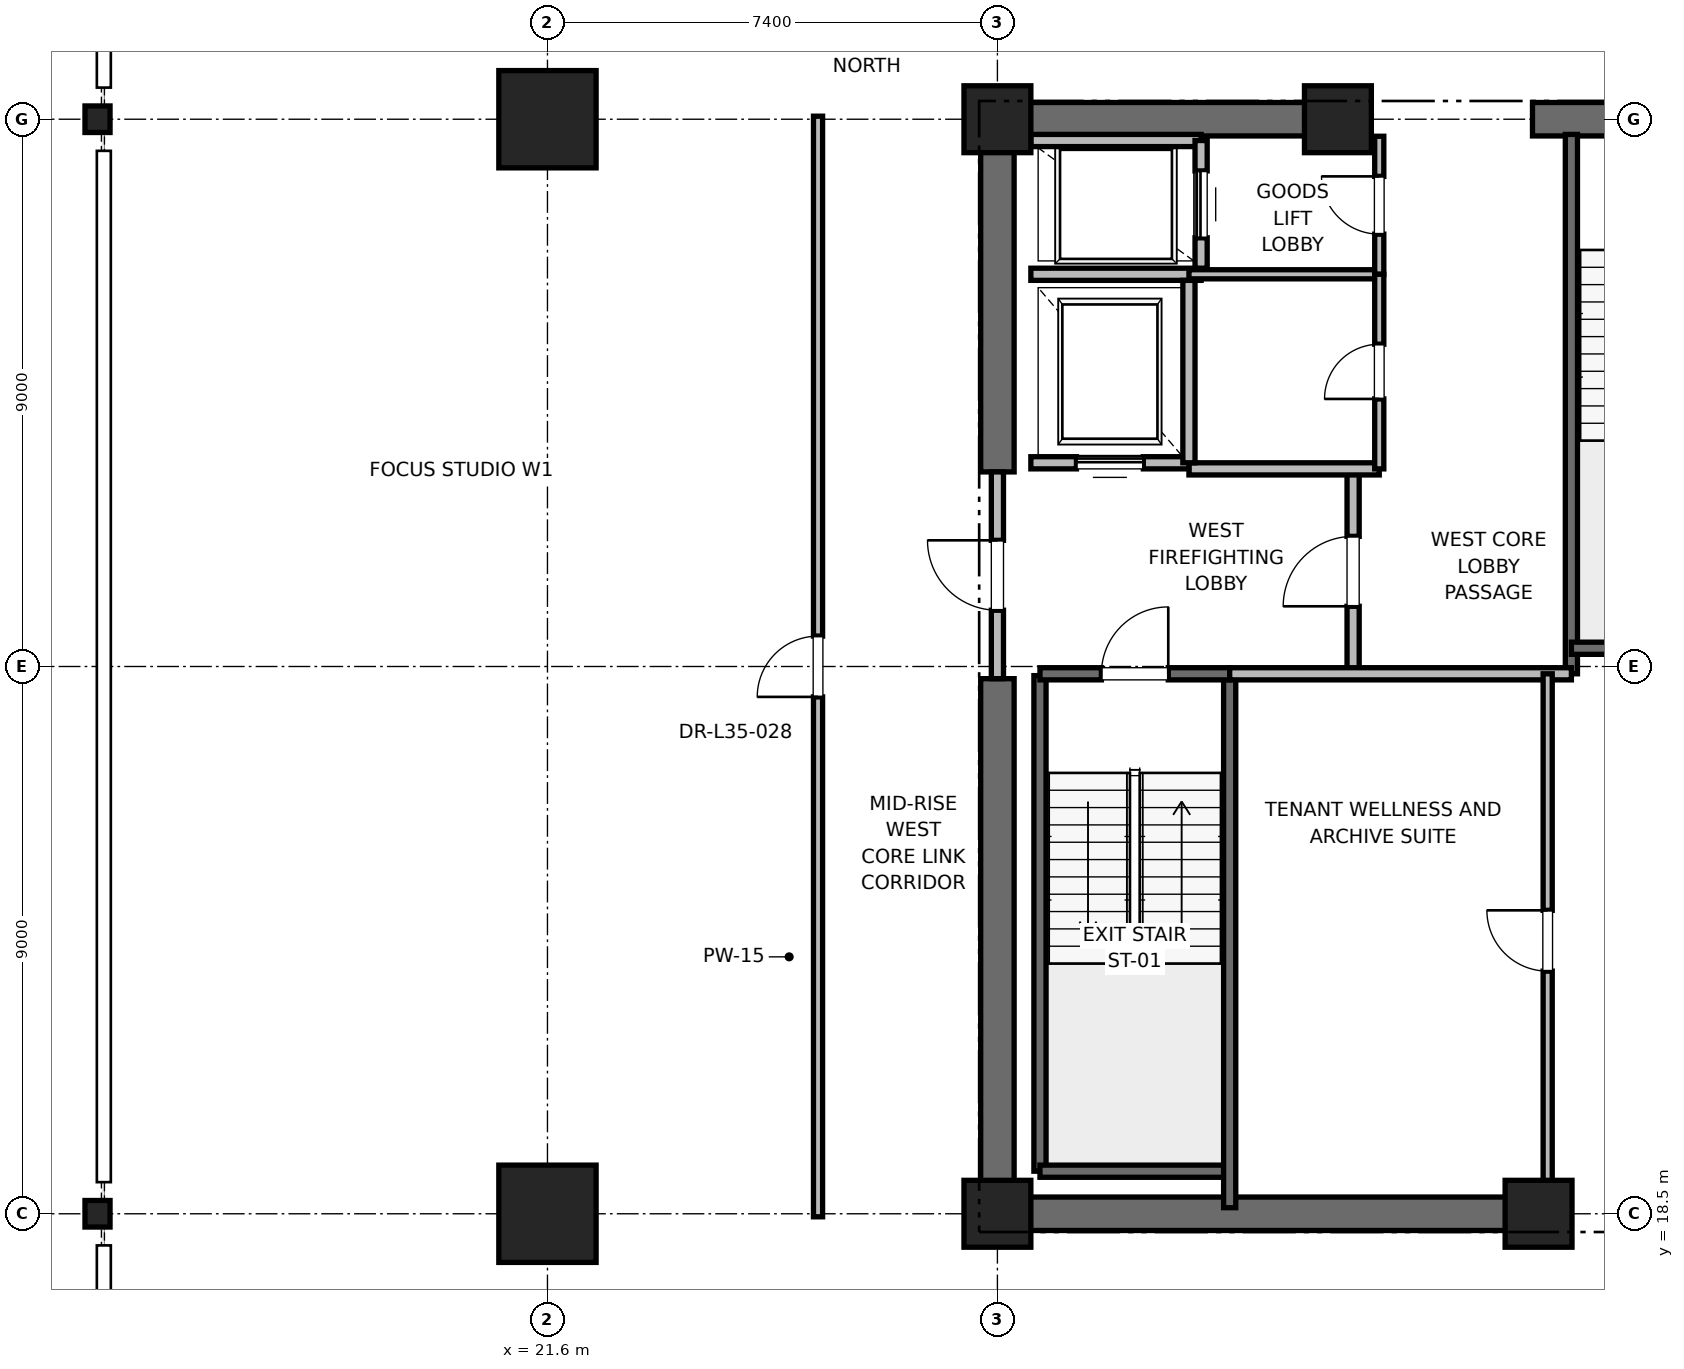
"""IFC4 building model, lengths in metres.
Left out: names, types, materials, properties, quantities, classifications, styles, units other than length and angle.
Written with IfcOpenShell. Run it as: python <this file> out.ifc"""

import sys

from ifc_helpers import new_model, si_unit, direction, frame, frame_2d, origin, origin_2d, place, context, subcontext, project, spatial, rectangle, i_section, extrude, element, fill, save


model = new_model("IFC4")
c1 = context("Model", 3, precision=1e-05, world=origin(), true_north=direction((0.0, 1.0)))
c2 = subcontext(c1, "Body", "Model", "MODEL_VIEW")
j1 = project(units=[si_unit("LENGTHUNIT", "METRE"), si_unit("PLANEANGLEUNIT", "RADIAN")], contexts=[c1])
p1 = place(None, origin())
s1 = spatial("IfcSite", under=j1, at=p1, CompositionType="ELEMENT")
p2 = place(p1, origin())
s2 = spatial("IfcBuilding", under=s1, at=p2, CompositionType="ELEMENT")
p3 = place(p2, frame((0.0, 0.0, 152.4)))
s3 = spatial("IfcBuildingStorey", under=s2, at=p3, CompositionType="ELEMENT", Elevation=152.4)
for number, where, z_axis, x_axis in (
    (1, (21.6, 18.5, 0.0), (0.0, 0.0, 1.0), (1.0, 0.0, 0.0)),
    (2, (21.6, 36.5, 0.0), (0.0, 0.0, 1.0), (1.0, 0.0, 0.0)),
):
    element("IfcColumn", number, at=place(p3, frame(where, z_axis=z_axis, x_axis=x_axis)), inside=s3, PredefinedType="COLUMN", context=c2, shape_type="SweptSolid", body=[
        extrude(rectangle(XDim=1.6, YDim=1.6, at=origin_2d()), origin(), (0.0, 0.0, 1.0), 4.0),
    ])
for number, where, z_axis, x_axis in (
    (3, (14.2, 18.5, 0.0), (0.0, 0.0, 1.0), (1.0, 0.0, 0.0)),
    (4, (14.2, 36.5, 0.0), (0.0, 0.0, 1.0), (1.0, 0.0, 0.0)),
):
    element("IfcColumn", number, at=place(p3, frame(where, z_axis=z_axis, x_axis=x_axis)), inside=s3, PredefinedType="COLUMN", context=c2, shape_type="SweptSolid", body=[
        extrude(i_section(OverallWidth=0.412, OverallDepth=0.437, WebThickness=0.036, FlangeThickness=0.058, FilletRadius=0.015, at=origin_2d()), origin(), (0.0, 0.0, 1.0), 4.0),
    ])
for number, where, z_axis, x_axis in (
    (5, (29.0, 18.5, 0.0), (0.0, 0.0, 1.0), (1.0, 0.0, 0.0)),
    (6, (29.0, 36.5, 0.0), (0.0, 0.0, 1.0), (1.0, 0.0, 0.0)),
    (7, (37.9, 18.5, 0.0), (0.0, 0.0, 1.0), (1.0, 0.0, 0.0)),
    (8, (34.6, 36.5, 0.0), (0.0, 0.0, 1.0), (1.0, 0.0, 0.0)),
):
    element("IfcColumn", number, at=place(p3, frame(where, z_axis=z_axis, x_axis=x_axis)), inside=s3, PredefinedType="PILASTER", context=c2, shape_type="SweptSolid", body=[
        extrude(rectangle(XDim=1.1, YDim=1.1, at=origin_2d()), origin(), (0.0, 0.0, 1.0), 4.0),
    ])
p4 = place(p3, frame((29.0, 18.5, 0.0), z_axis=(0.0, 0.0, 1.0), x_axis=(1.0, 0.0, 0.0)))
e9 = element("IfcWall", 9, at=p4, inside=s3, PredefinedType="SHEAR", context=c2, shape_type="SweptSolid", body=[
    extrude(rectangle(XDim=9.2, YDim=0.55, at=frame_2d((4.6, 0.0))), origin(), (0.0, 0.0, 1.0), 3.775),
])
p5 = place(p3, frame((29.0, 36.5, 0.0), z_axis=(0.0, 0.0, 1.0), x_axis=(1.0, 0.0, 0.0)))
e10 = element("IfcWall", 10, at=p5, inside=s3, PredefinedType="SHEAR", context=c2, shape_type="SweptSolid", body=[
    extrude(rectangle(XDim=5.8, YDim=0.55, at=frame_2d((2.9, 0.0))), origin(), (0.0, 0.0, 1.0), 3.775),
])
p6 = place(p3, frame((37.8, 36.5, 0.0), z_axis=(0.0, 0.0, 1.0), x_axis=(1.0, 0.0, 0.0)))
e11 = element("IfcWall", 11, at=p6, inside=s3, PredefinedType="SHEAR", context=c2, shape_type="SweptSolid", body=[
    extrude(rectangle(XDim=4.4, YDim=0.55, at=frame_2d((2.2, 0.0))), origin(), (0.0, 0.0, 1.0), 3.775),
])
p7 = place(p6, frame((1.65, 0.0, 0.0)))
e12 = element("IfcOpeningElement", 12, at=p7, cuts=e11, PredefinedType="OPENING", context=c2, shape_type="SweptSolid", body=[
    extrude(rectangle(XDim=1.1, YDim=2.15, at=frame_2d((0.55, 1.075))), frame((0.0, 0.275, 0.0), z_axis=(0.0, -1.0, 0.0), x_axis=(1.0, 0.0, 0.0)), (0.0, 0.0, 1.0), 0.55),
])
p8 = place(p3, frame((29.0, 18.5, 0.0), z_axis=(0.0, 0.0, 1.0), x_axis=(0.0, 1.0, 0.0)))
e13 = element("IfcWall", 13, at=p8, inside=s3, PredefinedType="SHEAR", context=c2, shape_type="SweptSolid", body=[
    extrude(rectangle(XDim=8.8, YDim=0.55, at=frame_2d((4.4, 0.0))), origin(), (0.0, 0.0, 1.0), 3.775),
])
p9 = place(p3, frame((29.0, 30.7, 0.0), z_axis=(0.0, 0.0, 1.0), x_axis=(0.0, 1.0, 0.0)))
e14 = element("IfcWall", 14, at=p9, inside=s3, PredefinedType="SHEAR", context=c2, shape_type="SweptSolid", body=[
    extrude(rectangle(XDim=5.8, YDim=0.55, at=frame_2d((2.9, 0.0))), origin(), (0.0, 0.0, 1.0), 3.775),
])
p10 = place(p3, frame((29.7, 19.2, 0.0), z_axis=(0.0, 0.0, 1.0), x_axis=(0.0, 1.0, 0.0)))
e15 = element("IfcWall", 15, at=p10, inside=s3, PredefinedType="SOLIDWALL", context=c2, shape_type="SweptSolid", body=[
    extrude(rectangle(XDim=8.15, YDim=0.2, at=frame_2d((4.075, 0.0))), origin(), (0.0, 0.0, 1.0), 3.775),
])
p11 = place(p3, frame((29.7, 19.2, 0.0), z_axis=(0.0, 0.0, 1.0), x_axis=(1.0, 0.0, 0.0)))
e16 = element("IfcWall", 16, at=p11, inside=s3, PredefinedType="SOLIDWALL", context=c2, shape_type="SweptSolid", body=[
    extrude(rectangle(XDim=3.12, YDim=0.2, at=frame_2d((1.56, 0.0))), origin(), (0.0, 0.0, 1.0), 3.775),
])
p12 = place(p3, frame((32.82, 18.6, 0.0), z_axis=(0.0, 0.0, 1.0), x_axis=(0.0, 1.0, 0.0)))
e17 = element("IfcWall", 17, at=p12, inside=s3, PredefinedType="SOLIDWALL", context=c2, shape_type="SweptSolid", body=[
    extrude(rectangle(XDim=8.78, YDim=0.2, at=frame_2d((4.39, 0.0))), origin(), (0.0, 0.0, 1.0), 3.775),
])
p13 = place(p3, frame((29.7, 27.38, 0.0), z_axis=(0.0, 0.0, 1.0), x_axis=(1.0, 0.0, 0.0)))
e18 = element("IfcWall", 18, at=p13, inside=s3, PredefinedType="SOLIDWALL", context=c2, shape_type="SweptSolid", body=[
    extrude(rectangle(XDim=3.12, YDim=0.2, at=frame_2d((1.56, 0.0))), origin(), (0.0, 0.0, 1.0), 3.775),
])
p14 = place(p13, frame((1.01, 0.0, 0.0)))
e19 = element("IfcOpeningElement", 19, at=p14, cuts=e18, PredefinedType="OPENING", context=c2, shape_type="SweptSolid", body=[
    extrude(rectangle(XDim=1.1, YDim=2.15, at=frame_2d((0.55, 1.075))), frame((0.0, 0.1, 0.0), z_axis=(0.0, -1.0, 0.0), x_axis=(1.0, 0.0, 0.0)), (0.0, 0.0, 1.0), 0.2),
])
p15 = place(p3, frame((38.44, 27.38, 0.0), z_axis=(0.0, 0.0, 1.0), x_axis=(0.0, 1.0, 0.0)))
e20 = element("IfcWall", 20, at=p15, inside=s3, PredefinedType="SOLIDWALL", context=c2, shape_type="SweptSolid", body=[
    extrude(rectangle(XDim=8.87, YDim=0.2, at=frame_2d((4.435, 0.0))), origin(), (0.0, 0.0, 1.0), 3.775),
])
p16 = place(p3, frame((38.44, 27.8, 0.0), z_axis=(0.0, 0.0, 1.0), x_axis=(1.0, 0.0, 0.0)))
e21 = element("IfcWall", 21, at=p16, inside=s3, PredefinedType="SOLIDWALL", context=c2, shape_type="SweptSolid", body=[
    extrude(rectangle(XDim=3.32, YDim=0.2, at=frame_2d((1.66, 0.0))), origin(), (0.0, 0.0, 1.0), 3.775),
])
p17 = place(p3, frame((34.85, 27.38, 0.0), z_axis=(0.0, 0.0, 1.0), x_axis=(0.0, 1.0, 0.0)))
e22 = element("IfcWall", 22, at=p17, inside=s3, PredefinedType="PARTITIONING", context=c2, shape_type="SweptSolid", body=[
    extrude(rectangle(XDim=3.37, YDim=0.2, at=frame_2d((1.685, 0.0))), origin(), (0.0, 0.0, 1.0), 3.775),
])
p18 = place(p17, frame((1.11, 0.0, 0.0)))
e23 = element("IfcOpeningElement", 23, at=p18, cuts=e22, PredefinedType="OPENING", context=c2, shape_type="SweptSolid", body=[
    extrude(rectangle(XDim=1.15, YDim=2.2, at=frame_2d((0.575, 1.1))), frame((0.0, 0.1, 0.0), z_axis=(0.0, -1.0, 0.0), x_axis=(1.0, 0.0, 0.0)), (0.0, 0.0, 1.0), 0.2),
])
p19 = place(p3, frame((29.0, 27.3, 0.0), z_axis=(0.0, 0.0, 1.0), x_axis=(0.0, 1.0, 0.0)))
e24 = element("IfcWall", 24, at=p19, inside=s3, PredefinedType="PARTITIONING", context=c2, shape_type="SweptSolid", body=[
    extrude(rectangle(XDim=3.4, YDim=0.2, at=frame_2d((1.7, 0.0))), origin(), (0.0, 0.0, 1.0), 2.755),
])
p20 = place(p19, frame((1.125, 0.0, 0.0)))
e25 = element("IfcOpeningElement", 25, at=p20, cuts=e24, PredefinedType="OPENING", context=c2, shape_type="SweptSolid", body=[
    extrude(rectangle(XDim=1.15, YDim=2.2, at=frame_2d((0.575, 1.1))), frame((0.0, 0.1, 0.0), z_axis=(0.0, -1.0, 0.0), x_axis=(1.0, 0.0, 0.0)), (0.0, 0.0, 1.0), 0.2),
])
p21 = place(p3, frame((32.82, 27.38, 0.0), z_axis=(0.0, 0.0, 1.0), x_axis=(1.0, 0.0, 0.0)))
e26 = element("IfcWall", 26, at=p21, inside=s3, PredefinedType="PARTITIONING", context=c2, shape_type="SweptSolid", body=[
    extrude(rectangle(XDim=5.62, YDim=0.2, at=frame_2d((2.81, 0.0))), origin(), (0.0, 0.0, 1.0), 3.775),
])
p22 = place(p3, frame((32.15, 30.75, 0.0), z_axis=(0.0, 0.0, 1.0), x_axis=(1.0, 0.0, 0.0)))
e27 = element("IfcWall", 27, at=p22, inside=s3, PredefinedType="PARTITIONING", context=c2, shape_type="SweptSolid", body=[
    extrude(rectangle(XDim=3.13, YDim=0.2, at=frame_2d((1.565, 0.0))), origin(), (0.0, 0.0, 1.0), 3.775),
])
p23 = place(p3, frame((29.55, 30.85, 0.0), z_axis=(0.0, 0.0, 1.0), x_axis=(1.0, 0.0, 0.0)))
e28 = element("IfcWall", 28, at=p23, inside=s3, PredefinedType="SOLIDWALL", context=c2, shape_type="SweptSolid", body=[
    extrude(rectangle(XDim=2.6, YDim=0.2, at=frame_2d((1.3, 0.0))), origin(), (0.0, 0.0, 1.0), 2.755),
])
p24 = place(p23, frame((0.75, 0.0, 0.0)))
e29 = element("IfcOpeningElement", 29, at=p24, cuts=e28, PredefinedType="OPENING", context=c2, shape_type="SweptSolid", body=[
    extrude(rectangle(XDim=1.1, YDim=2.2, at=frame_2d((0.55, 1.1))), frame((0.0, 0.1, 0.0), z_axis=(0.0, -1.0, 0.0), x_axis=(1.0, 0.0, 0.0)), (0.0, 0.0, 1.0), 0.2),
])
p25 = place(p3, frame((29.55, 33.95, 0.0), z_axis=(0.0, 0.0, 1.0), x_axis=(1.0, 0.0, 0.0)))
e30 = element("IfcWall", 30, at=p25, inside=s3, PredefinedType="SOLIDWALL", context=c2, shape_type="SweptSolid", body=[
    extrude(rectangle(XDim=2.8, YDim=0.2, at=frame_2d((1.4, 0.0))), origin(), (0.0, 0.0, 1.0), 3.775),
])
p26 = place(p3, frame((32.15, 30.85, 0.0), z_axis=(0.0, 0.0, 1.0), x_axis=(0.0, 1.0, 0.0)))
e31 = element("IfcWall", 31, at=p26, inside=s3, PredefinedType="SOLIDWALL", context=c2, shape_type="SweptSolid", body=[
    extrude(rectangle(XDim=3.0, YDim=0.2, at=frame_2d((1.5, 0.0))), origin(), (0.0, 0.0, 1.0), 3.775),
])
p27 = place(p3, frame((32.35, 36.15, 0.0), z_axis=(0.0, 0.0, 1.0), x_axis=(-1.0, 0.0, 0.0)))
e32 = element("IfcWall", 32, at=p27, inside=s3, PredefinedType="SOLIDWALL", context=c2, shape_type="SweptSolid", body=[
    extrude(rectangle(XDim=2.8, YDim=0.2, at=frame_2d((1.4, 0.0))), origin(), (0.0, 0.0, 1.0), 2.985),
])
p28 = place(p3, frame((32.35, 34.05, 0.0), z_axis=(0.0, 0.0, 1.0), x_axis=(0.0, 1.0, 0.0)))
e33 = element("IfcWall", 33, at=p28, inside=s3, PredefinedType="SOLIDWALL", context=c2, shape_type="SweptSolid", body=[
    extrude(rectangle(XDim=2.1, YDim=0.2, at=frame_2d((1.05, 0.0))), origin(), (0.0, 0.0, 1.0), 3.775),
])
p29 = place(p28, frame((0.5, 0.0, 0.0)))
e34 = element("IfcOpeningElement", 34, at=p29, cuts=e33, PredefinedType="OPENING", context=c2, shape_type="SweptSolid", body=[
    extrude(rectangle(XDim=1.1, YDim=2.2, at=frame_2d((0.55, 1.1))), frame((0.0, 0.1, 0.0), z_axis=(0.0, -1.0, 0.0), x_axis=(1.0, 0.0, 0.0)), (0.0, 0.0, 1.0), 0.2),
])
p30 = place(p3, frame((32.15, 33.95, 0.0), z_axis=(0.0, 0.0, 1.0), x_axis=(1.0, 0.0, 0.0)))
e35 = element("IfcWall", 35, at=p30, inside=s3, PredefinedType="PARTITIONING", context=c2, shape_type="SweptSolid", body=[
    extrude(rectangle(XDim=3.13, YDim=0.15, at=frame_2d((1.565, 0.0))), origin(), (0.0, 0.0, 1.0), 2.85),
])
p31 = place(p3, frame((35.28, 33.95, 0.0), z_axis=(0.0, 0.0, 1.0), x_axis=(0.0, 1.0, 0.0)))
e36 = element("IfcWall", 36, at=p31, inside=s3, PredefinedType="PARTITIONING", context=c2, shape_type="SweptSolid", body=[
    extrude(rectangle(XDim=2.27, YDim=0.15, at=frame_2d((1.135, 0.0))), origin(), (0.0, 0.0, 1.0), 2.755),
])
p32 = place(p31, frame((0.66, 0.0, 0.0)))
e37 = element("IfcOpeningElement", 37, at=p32, cuts=e36, PredefinedType="OPENING", context=c2, shape_type="SweptSolid", body=[
    extrude(rectangle(XDim=0.95, YDim=2.15, at=frame_2d((0.475, 1.075))), frame((0.0, 0.075, 0.0), z_axis=(0.0, -1.0, 0.0), x_axis=(1.0, 0.0, 0.0)), (0.0, 0.0, 1.0), 0.15),
])
p33 = place(p3, frame((35.28, 30.75, 0.0), z_axis=(0.0, 0.0, 1.0), x_axis=(0.0, 1.0, 0.0)))
e38 = element("IfcWall", 38, at=p33, inside=s3, PredefinedType="PARTITIONING", context=c2, shape_type="SweptSolid", body=[
    extrude(rectangle(XDim=3.2, YDim=0.15, at=frame_2d((1.6, 0.0))), origin(), (0.0, 0.0, 1.0), 2.85),
])
p34 = place(p33, frame((1.15, 0.0, 0.0)))
e39 = element("IfcOpeningElement", 39, at=p34, cuts=e38, PredefinedType="OPENING", context=c2, shape_type="SweptSolid", body=[
    extrude(rectangle(XDim=0.9, YDim=2.1, at=frame_2d((0.45, 1.05))), frame((0.0, 0.075, 0.0), z_axis=(0.0, -1.0, 0.0), x_axis=(1.0, 0.0, 0.0)), (0.0, 0.0, 1.0), 0.15),
])
p35 = place(p3, frame((38.05, 18.6, 0.0), z_axis=(0.0, 0.0, 1.0), x_axis=(0.0, 1.0, 0.0)))
e40 = element("IfcWall", 40, at=p35, inside=s3, PredefinedType="PARTITIONING", context=c2, shape_type="SweptSolid", body=[
    extrude(rectangle(XDim=8.78, YDim=0.15, at=frame_2d((4.39, 0.0))), origin(), (0.0, 0.0, 1.0), 2.755),
])
p36 = place(p35, frame((3.89, 0.0, 0.0)))
e41 = element("IfcOpeningElement", 41, at=p36, cuts=e40, PredefinedType="OPENING", context=c2, shape_type="SweptSolid", body=[
    extrude(rectangle(XDim=1.0, YDim=2.15, at=frame_2d((0.5, 1.075))), frame((0.0, 0.075, 0.0), z_axis=(0.0, -1.0, 0.0), x_axis=(1.0, 0.0, 0.0)), (0.0, 0.0, 1.0), 0.15),
])
p37 = place(p3, frame((26.05, 18.45, 0.0), z_axis=(0.0, 0.0, 1.0), x_axis=(0.0, 1.0, 0.0)))
e42 = element("IfcWall", 42, at=p37, inside=s3, PredefinedType="PARTITIONING", context=c2, shape_type="SweptSolid", body=[
    extrude(rectangle(XDim=18.1, YDim=0.15, at=frame_2d((9.05, 0.0))), origin(), (0.0, 0.0, 1.0), 2.85),
])
p38 = place(p37, frame((8.55, 0.0, 0.0)))
e43 = element("IfcOpeningElement", 43, at=p38, cuts=e42, PredefinedType="OPENING", context=c2, shape_type="SweptSolid", body=[
    extrude(rectangle(XDim=1.0, YDim=2.15, at=frame_2d((0.5, 1.075))), frame((0.0, 0.075, 0.0), z_axis=(0.0, -1.0, 0.0), x_axis=(1.0, 0.0, 0.0)), (0.0, 0.0, 1.0), 0.15),
])
p39 = place(p14, origin())
e44 = element("IfcDoor", 44, at=p39, inside=s3, OperationType="SINGLE_SWING_RIGHT", PredefinedType="DOOR", context=c2, shape_type="SweptSolid", body=[
    extrude(rectangle(XDim=1.1, YDim=2.15, at=frame_2d((0.55, 1.075))), frame((0.0, 0.025, 0.0), z_axis=(0.0, -1.0, 0.0), x_axis=(1.0, 0.0, 0.0)), (0.0, 0.0, 1.0), 0.05),
])
fill(e19, e44)
p40 = place(p18, origin())
e45 = element("IfcDoor", 45, at=p40, inside=s3, OperationType="SINGLE_SWING_LEFT", PredefinedType="DOOR", context=c2, shape_type="SweptSolid", body=[
    extrude(rectangle(XDim=1.15, YDim=2.2, at=frame_2d((0.575, 1.1))), frame((0.0, 0.025, 0.0), z_axis=(0.0, -1.0, 0.0), x_axis=(1.0, 0.0, 0.0)), (0.0, 0.0, 1.0), 0.05),
])
fill(e23, e45)
p41 = place(p20, origin())
e46 = element("IfcDoor", 46, at=p41, inside=s3, OperationType="SINGLE_SWING_RIGHT", PredefinedType="DOOR", context=c2, shape_type="SweptSolid", body=[
    extrude(rectangle(XDim=1.15, YDim=2.2, at=frame_2d((0.575, 1.1))), frame((0.0, 0.025, 0.0), z_axis=(0.0, -1.0, 0.0), x_axis=(1.0, 0.0, 0.0)), (0.0, 0.0, 1.0), 0.05),
])
fill(e25, e46)
p42 = place(p24, origin())
e47 = element("IfcDoor", 47, at=p42, inside=s3, OperationType="SLIDING_TO_RIGHT", PredefinedType="DOOR", context=c2, shape_type="SweptSolid", body=[
    extrude(rectangle(XDim=1.1, YDim=2.2, at=frame_2d((0.55, 1.1))), frame((0.0, 0.025, 0.0), z_axis=(0.0, -1.0, 0.0), x_axis=(1.0, 0.0, 0.0)), (0.0, 0.0, 1.0), 0.05),
])
fill(e29, e47)
p43 = place(p29, origin())
e48 = element("IfcDoor", 48, at=p43, inside=s3, OperationType="SLIDING_TO_RIGHT", PredefinedType="DOOR", context=c2, shape_type="SweptSolid", body=[
    extrude(rectangle(XDim=1.1, YDim=2.2, at=frame_2d((0.55, 1.1))), frame((0.0, 0.025, 0.0), z_axis=(0.0, -1.0, 0.0), x_axis=(1.0, 0.0, 0.0)), (0.0, 0.0, 1.0), 0.05),
])
fill(e34, e48)
p44 = place(p32, origin())
e49 = element("IfcDoor", 49, at=p44, inside=s3, OperationType="SINGLE_SWING_RIGHT", PredefinedType="DOOR", context=c2, shape_type="SweptSolid", body=[
    extrude(rectangle(XDim=0.95, YDim=2.15, at=frame_2d((0.475, 1.075))), frame((0.0, 0.025, 0.0), z_axis=(0.0, -1.0, 0.0), x_axis=(1.0, 0.0, 0.0)), (0.0, 0.0, 1.0), 0.05),
])
fill(e37, e49)
p45 = place(p34, origin())
e50 = element("IfcDoor", 50, at=p45, inside=s3, OperationType="SINGLE_SWING_LEFT", PredefinedType="DOOR", context=c2, shape_type="SweptSolid", body=[
    extrude(rectangle(XDim=0.9, YDim=2.1, at=frame_2d((0.45, 1.05))), frame((0.0, 0.025, 0.0), z_axis=(0.0, -1.0, 0.0), x_axis=(1.0, 0.0, 0.0)), (0.0, 0.0, 1.0), 0.05),
])
fill(e39, e50)
p46 = place(p36, origin())
e51 = element("IfcDoor", 51, at=p46, inside=s3, OperationType="SINGLE_SWING_RIGHT", PredefinedType="DOOR", context=c2, shape_type="SweptSolid", body=[
    extrude(rectangle(XDim=1.0, YDim=2.15, at=frame_2d((0.5, 1.075))), frame((0.0, 0.025, 0.0), z_axis=(0.0, -1.0, 0.0), x_axis=(1.0, 0.0, 0.0)), (0.0, 0.0, 1.0), 0.05),
])
fill(e41, e51)
p47 = place(p38, origin())
e52 = element("IfcDoor", 52, at=p47, inside=s3, OperationType="SINGLE_SWING_LEFT", PredefinedType="DOOR", context=c2, shape_type="SweptSolid", body=[
    extrude(rectangle(XDim=1.0, YDim=2.15, at=frame_2d((0.5, 1.075))), frame((0.0, 0.025, 0.0), z_axis=(0.0, -1.0, 0.0), x_axis=(1.0, 0.0, 0.0)), (0.0, 0.0, 1.0), 0.05),
])
fill(e43, e52)
save(model, sys.argv[1])
